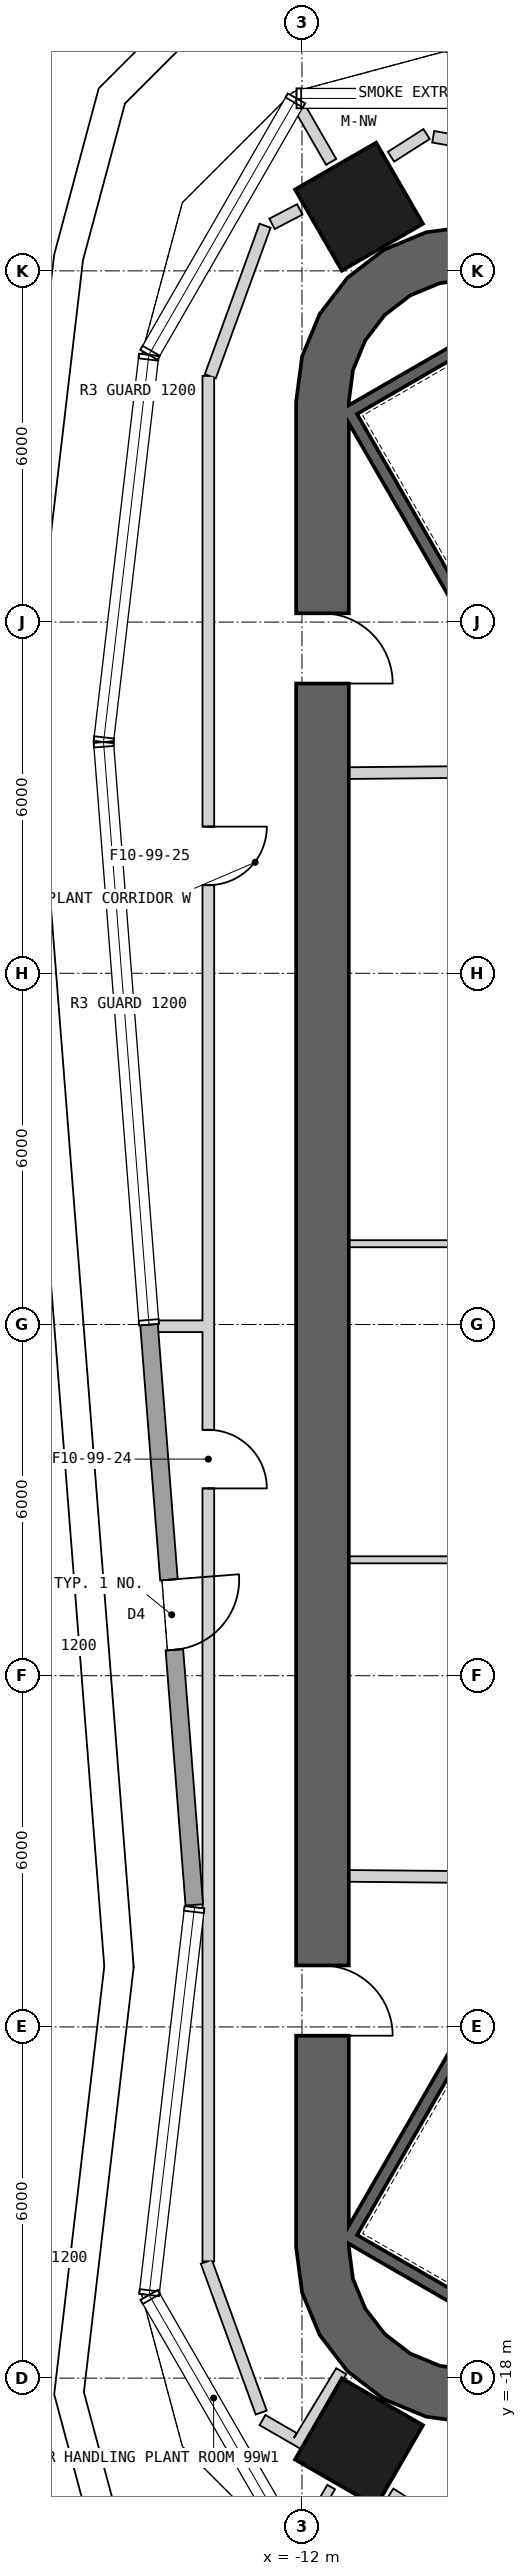
"""IFC4 building model, lengths in metres.
Left out: names, types, materials, properties, quantities, classifications, styles, units other than length and angle.
Written with IfcOpenShell. Run it as: python <this file> out.ifc"""

import sys

from ifc_helpers import new_model, si_unit, direction, frame, frame_2d, origin, origin_2d, place, context, subcontext, project, spatial, polyline, rectangle, outline, extrude, element, fill, save


model = new_model("IFC4")
c1 = context("Model", 3, precision=1e-05, world=origin(), true_north=direction((0.0, 1.0)))
c2 = subcontext(c1, "Body", "Model", "MODEL_VIEW")
j1 = project(units=[si_unit("LENGTHUNIT", "METRE"), si_unit("PLANEANGLEUNIT", "RADIAN")], contexts=[c1])
p1 = place(None, origin())
s1 = spatial("IfcSite", under=j1, at=p1, CompositionType="ELEMENT")
p2 = place(p1, origin())
s2 = spatial("IfcBuilding", under=s1, at=p2, CompositionType="ELEMENT")
p3 = place(p2, frame((0.0, 0.0, 440.3)))
s3 = spatial("IfcBuildingStorey", under=s2, at=p3, CompositionType="ELEMENT", Elevation=440.3)
for number, where, z_axis, x_axis in (
    (1, (-11.025, 19.097, 0.0), (0.0, 0.0, 1.0), (-0.5, 0.866, 0.0)),
    (2, (-11.025, -19.097, 0.0), (0.0, 0.0, 1.0), (-0.5, -0.866, 0.0)),
):
    element("IfcColumn", number, at=place(p3, frame(where, z_axis=z_axis, x_axis=x_axis)), inside=s3, PredefinedType="COLUMN", context=c2, shape_type="SweptSolid", body=[
        extrude(rectangle(XDim=1.6, YDim=1.6, at=origin_2d()), origin(), (0.0, 0.0, 1.0), 4.7),
    ])
p4 = place(p3, frame((-11.65, 15.762, 0.0), z_axis=(0.0, 0.0, 1.0), x_axis=(0.0, -1.0, 0.0)))
e3 = element("IfcWall", 3, at=p4, inside=s3, PredefinedType="SHEAR", context=c2, shape_type="SweptSolid", body=[
    extrude(rectangle(XDim=31.523, YDim=0.9, at=frame_2d((15.762, 0.0))), origin(), (0.0, 0.0, 1.0), 4.7),
])
p5 = place(p4, frame((3.612, 0.0, 0.0)))
e4 = element("IfcOpeningElement", 4, at=p5, cuts=e3, PredefinedType="OPENING", context=c2, shape_type="SweptSolid", body=[
    extrude(rectangle(XDim=1.2, YDim=2.4, at=frame_2d((0.6, 1.2))), frame((0.0, 0.46, 0.0), z_axis=(0.0, -1.0, 0.0), x_axis=(1.0, 0.0, 0.0)), (0.0, 0.0, 1.0), 0.92),
])
p6 = place(p4, frame((26.712, 0.0, 0.0)))
e5 = element("IfcOpeningElement", 5, at=p6, cuts=e3, PredefinedType="OPENING", context=c2, shape_type="SweptSolid", body=[
    extrude(rectangle(XDim=1.2, YDim=2.4, at=frame_2d((0.6, 1.2))), frame((0.0, 0.46, 0.0), z_axis=(0.0, -1.0, 0.0), x_axis=(1.0, 0.0, 0.0)), (0.0, 0.0, 1.0), 0.92),
])
p7 = place(p3, origin())
e6 = element("IfcWall", 6, at=p7, inside=s3, PredefinedType="SHEAR", context=c2, shape_type="SweptSolid", body=[
    extrude(outline(polyline([(-7.6, 18.36), (-8.323, 18.659), (-9.1, 18.762), (-9.876, 18.659), (-10.6, 18.36), (-11.221, 17.883), (-11.698, 17.262), (-11.998, 16.538), (-12.1, 15.762), (-11.2, 15.762), (-11.128, 16.305), (-10.919, 16.812), (-10.585, 17.247), (-10.15, 17.58), (-9.644, 17.79), (-9.1, 17.862), (-8.556, 17.79), (-8.05, 17.58), (-7.6, 18.36)])), origin(), (0.0, 0.0, 1.0), 4.7),
])
p8 = place(p3, origin())
e7 = element("IfcWall", 7, at=p8, inside=s3, PredefinedType="SHEAR", context=c2, shape_type="SweptSolid", body=[
    extrude(outline(polyline([(-12.1, -15.762), (-11.998, -16.538), (-11.698, -17.262), (-11.221, -17.883), (-10.6, -18.36), (-9.876, -18.659), (-9.1, -18.762), (-8.323, -18.659), (-7.6, -18.36), (-8.05, -17.58), (-8.556, -17.79), (-9.1, -17.862), (-9.644, -17.79), (-10.15, -17.58), (-10.585, -17.247), (-10.919, -16.812), (-11.128, -16.305), (-11.2, -15.762), (-12.1, -15.762)])), origin(), (0.0, 0.0, 1.0), 4.7),
])
p9 = place(p3, frame((-14.614, -0.002, 0.0), z_axis=(0.0, 0.0, 1.0), x_axis=(0.077860592968, -0.996964256161, 0.0)))
e8 = element("IfcWall", 8, at=p9, inside=s3, PredefinedType="SOLIDWALL", context=c2, shape_type="SweptSolid", body=[
    extrude(rectangle(XDim=9.943, YDim=0.3, at=frame_2d((4.972, 0.0))), origin(), (0.0, 0.0, 1.0), 4.7),
])
p10 = place(p9, frame((4.372, 0.0, 0.0)))
e9 = element("IfcOpeningElement", 9, at=p10, cuts=e8, PredefinedType="OPENING", context=c2, shape_type="SweptSolid", body=[
    extrude(rectangle(XDim=1.2, YDim=2.4, at=frame_2d((0.6, 1.2))), frame((0.0, 0.16, 0.0), z_axis=(0.0, -1.0, 0.0), x_axis=(1.0, 0.0, 0.0)), (0.0, 0.0, 1.0), 0.32),
])
p11 = place(p3, frame((-11.245, 15.678, -0.25), z_axis=(0.0, 0.0, 1.0), x_axis=(0.499977274689, -0.866038523851, 0.0)))
e10 = element("IfcWall", 10, at=p11, inside=s3, PredefinedType="SHEAR", context=c2, shape_type="SweptSolid", body=[
    extrude(rectangle(XDim=8.1, YDim=0.2, at=frame_2d((4.05, 0.0))), origin(), (0.0, 0.0, 1.0), 4.95),
])
for number, where, z_axis, x_axis in (
    (11, (-7.818, 17.541, -0.25), (0.0, 0.0, 1.0), (-0.866, -0.5, 0.0)),
    (12, (-11.282, -15.541, -0.25), (0.0, 0.0, 1.0), (0.866, -0.5, 0.0)),
):
    element("IfcWall", number, at=place(p3, frame(where, z_axis=z_axis, x_axis=x_axis)), inside=s3, PredefinedType="SHEAR", context=c2, shape_type="SweptSolid", body=[
        extrude(rectangle(XDim=3.8, YDim=0.2, at=frame_2d((1.9, 0.0))), origin(), (0.0, 0.0, 1.0), 4.95),
    ])
p12 = place(p3, frame((-7.196, -8.663, -0.25), z_axis=(0.0, 0.0, 1.0), x_axis=(-0.499997992926, -0.866026562566, 0.0)))
e13 = element("IfcWall", 13, at=p12, inside=s3, PredefinedType="SHEAR", context=c2, shape_type="SweptSolid", body=[
    extrude(rectangle(XDim=7.9, YDim=0.2, at=frame_2d((3.95, 0.0))), origin(), (0.0, 0.0, 1.0), 4.95),
])
p13 = place(p3, frame((-11.2, 1.38, 0.0), z_axis=(0.0, 0.0, 1.0), x_axis=(1.0, 0.0, 0.0)))
e14 = element("IfcWall", 14, at=p13, inside=s3, PredefinedType="PARTITIONING", context=c2, shape_type="SweptSolid", body=[
    extrude(rectangle(XDim=3.25, YDim=0.12, at=frame_2d((1.625, 0.0))), origin(), (0.0, 0.0, 1.0), 4.7),
])
p14 = place(p3, frame((-7.85, 9.451, 0.0), z_axis=(0.0, 0.0, 1.0), x_axis=(-0.999957167047, -0.009255488683, 0.0)))
e15 = element("IfcWall", 15, at=p14, inside=s3, PredefinedType="PARTITIONING", context=c2, shape_type="SweptSolid", body=[
    extrude(rectangle(XDim=3.35, YDim=0.2, at=frame_2d((1.675, 0.0))), origin(), (0.0, 0.0, 1.0), 4.7),
])
p15 = place(p3, frame((-11.2, -4.02, 0.0), z_axis=(0.0, 0.0, 1.0), x_axis=(1.0, 0.0, 0.0)))
e16 = element("IfcWall", 16, at=p15, inside=s3, PredefinedType="PARTITIONING", context=c2, shape_type="SweptSolid", body=[
    extrude(rectangle(XDim=3.25, YDim=0.12, at=frame_2d((1.625, 0.0))), origin(), (0.0, 0.0, 1.0), 4.7),
])
p16 = place(p3, frame((-11.2, -9.42, 0.0), z_axis=(0.0, 0.0, 1.0), x_axis=(0.999957467379, -0.009222983926, 0.0)))
e17 = element("IfcWall", 17, at=p16, inside=s3, PredefinedType="PARTITIONING", context=c2, shape_type="SweptSolid", body=[
    extrude(rectangle(XDim=3.15, YDim=0.2, at=frame_2d((1.575, 0.0))), origin(), (0.0, 0.0, 1.0), 4.7),
])
p17 = place(p3, frame((-12.104, -19.161, 0.0), z_axis=(0.0, 0.0, 1.0), x_axis=(0.518475368733, 0.855092563421, 0.0)))
e18 = element("IfcWall", 18, at=p17, inside=s3, PredefinedType="PARTITIONING", context=c2, shape_type="SweptSolid", body=[
    extrude(rectangle(XDim=1.496, YDim=0.2, at=frame_2d((0.748, 0.0))), origin(), (0.0, 0.0, 1.0), 4.7),
])
p18 = place(p3, frame((-12.675, -18.717, 0.0), z_axis=(0.0, 0.0, 1.0), x_axis=(0.866047486323, -0.49996174997, 0.0)))
e19 = element("IfcWall", 19, at=p18, inside=s3, PredefinedType="PARTITIONING", context=c2, shape_type="SweptSolid", body=[
    extrude(rectangle(XDim=0.618, YDim=0.2, at=frame_2d((0.309, 0.0))), origin(), (0.0, 0.0, 1.0), 4.7),
])
p19 = place(p3, frame((-13.634, -16.011, 0.0), z_axis=(0.0, 0.0, 1.0), x_axis=(0.342043269434, -0.939684203248, 0.0)))
e20 = element("IfcWall", 20, at=p19, inside=s3, PredefinedType="PARTITIONING", context=c2, shape_type="SweptSolid", body=[
    extrude(rectangle(XDim=2.742, YDim=0.2, at=frame_2d((1.371, 0.0))), origin(), (0.0, 0.0, 1.0), 4.7),
])
p20 = place(p3, frame((-13.6, 16.206, 0.0), z_axis=(0.0, 0.0, 1.0), x_axis=(0.0, -1.0, 0.0)))
e21 = element("IfcWall", 21, at=p20, inside=s3, PredefinedType="PARTITIONING", context=c2, shape_type="SweptSolid", body=[
    extrude(rectangle(XDim=16.256, YDim=0.2, at=frame_2d((8.128, 0.0))), origin(), (0.0, 0.0, 1.0), 4.7),
])
p21 = place(p20, frame((7.7, 0.0, 0.0)))
e22 = element("IfcOpeningElement", 22, at=p21, cuts=e21, PredefinedType="OPENING", context=c2, shape_type="SweptSolid", body=[
    extrude(rectangle(XDim=1.0, YDim=2.1, at=frame_2d((0.5, 1.05))), frame((0.0, 0.11, 0.0), z_axis=(0.0, -1.0, 0.0), x_axis=(1.0, 0.0, 0.0)), (0.0, 0.0, 1.0), 0.22),
])
p22 = place(p3, frame((-13.6, -0.05, 0.0), z_axis=(0.0, 0.0, 1.0), x_axis=(0.0, -1.0, 0.0)))
e23 = element("IfcWall", 23, at=p22, inside=s3, PredefinedType="PARTITIONING", context=c2, shape_type="SweptSolid", body=[
    extrude(rectangle(XDim=15.956, YDim=0.2, at=frame_2d((7.978, 0.0))), origin(), (0.0, 0.0, 1.0), 4.7),
])
p23 = place(p22, frame((1.75, 0.0, 0.0)))
e24 = element("IfcOpeningElement", 24, at=p23, cuts=e23, PredefinedType="OPENING", context=c2, shape_type="SweptSolid", body=[
    extrude(rectangle(XDim=1.0, YDim=2.1, at=frame_2d((0.5, 1.05))), frame((0.0, 0.11, 0.0), z_axis=(0.0, -1.0, 0.0), x_axis=(1.0, 0.0, 0.0)), (0.0, 0.0, 1.0), 0.22),
])
p24 = place(p3, frame((-12.63, 18.771, 0.0), z_axis=(0.0, 0.0, 1.0), x_axis=(-0.342015224264, -0.939694411163, 0.0)))
e25 = element("IfcWall", 25, at=p24, inside=s3, PredefinedType="PARTITIONING", context=c2, shape_type="SweptSolid", body=[
    extrude(rectangle(XDim=2.737, YDim=0.2, at=frame_2d((1.368, 0.0))), origin(), (0.0, 0.0, 1.0), 4.7),
])
p25 = place(p3, frame((-12.038, 19.05, 0.0), z_axis=(0.0, 0.0, 1.0), x_axis=(-0.887186880255, -0.461410272429, 0.0)))
e26 = element("IfcWall", 26, at=p25, inside=s3, PredefinedType="PARTITIONING", context=c2, shape_type="SweptSolid", body=[
    extrude(rectangle(XDim=0.534, YDim=0.2, at=frame_2d((0.267, 0.0))), origin(), (0.0, 0.0, 1.0), 4.7),
])
p26 = place(p3, frame((-14.486, -0.03, 0.0), z_axis=(0.0, 0.0, 1.0), x_axis=(1.0, 0.0, 0.0)))
e27 = element("IfcWall", 27, at=p26, inside=s3, PredefinedType="PARTITIONING", context=c2, shape_type="SweptSolid", body=[
    extrude(rectangle(XDim=0.786, YDim=0.2, at=frame_2d((0.393, 0.0))), origin(), (0.0, 0.0, 1.0), 4.7),
])
p27 = place(p3, frame((-11.501, -19.861, 0.0), z_axis=(0.0, 0.0, 1.0), x_axis=(-0.500107244371, -0.865963477364, 0.0)))
e28 = element("IfcWall", 28, at=p27, inside=s3, PredefinedType="PLUMBINGWALL", context=c2, shape_type="SweptSolid", body=[
    extrude(rectangle(XDim=1.098, YDim=0.15, at=frame_2d((0.549, 0.0))), origin(), (0.0, 0.0, 1.0), 4.7),
])
p28 = place(p3, frame((-11.501, 19.861, 0.0), z_axis=(0.0, 0.0, 1.0), x_axis=(-0.500107244371, 0.865963477364, 0.0)))
e29 = element("IfcWall", 29, at=p28, inside=s3, PredefinedType="PARTITIONING", context=c2, shape_type="SweptSolid", body=[
    extrude(rectangle(XDim=1.098, YDim=0.2, at=frame_2d((0.549, 0.0))), origin(), (0.0, 0.0, 1.0), 4.7),
])
p29 = place(p3, frame((-9.87, 20.337, 0.0), z_axis=(0.0, 0.0, 1.0), x_axis=(-0.843326891705, -0.537400924569, 0.0)))
e30 = element("IfcWall", 30, at=p29, inside=s3, PredefinedType="PARTITIONING", context=c2, shape_type="SweptSolid", body=[
    extrude(rectangle(XDim=0.721, YDim=0.2, at=frame_2d((0.361, 0.0))), origin(), (0.0, 0.0, 1.0), 4.7),
])
p30 = place(p3, frame((-7.246, 19.848, 0.0), z_axis=(0.0, 0.0, 1.0), x_axis=(-0.984816315713, 0.173599609177, 0.0)))
e31 = element("IfcWall", 31, at=p30, inside=s3, PredefinedType="PARTITIONING", context=c2, shape_type="SweptSolid", body=[
    extrude(rectangle(XDim=2.55, YDim=0.2, at=frame_2d((1.275, 0.0))), origin(), (0.0, 0.0, 1.0), 4.7),
])
p31 = place(p3, frame((-9.932, -20.322, 0.0), z_axis=(0.0, 0.0, 1.0), x_axis=(0.984813908974, 0.173613261856, 0.0)))
e32 = element("IfcWall", 32, at=p31, inside=s3, PredefinedType="PLUMBINGWALL", context=c2, shape_type="SweptSolid", body=[
    extrude(rectangle(XDim=2.752, YDim=0.15, at=frame_2d((1.376, 0.0))), origin(), (0.0, 0.0, 1.0), 4.7),
])
p32 = place(p3, frame((-10.479, -19.95, 0.0), z_axis=(0.0, 0.0, 1.0), x_axis=(0.843309487859, -0.537428234917, 0.0)))
e33 = element("IfcWall", 33, at=p32, inside=s3, PredefinedType="PLUMBINGWALL", context=c2, shape_type="SweptSolid", body=[
    extrude(rectangle(XDim=0.572, YDim=0.15, at=frame_2d((0.286, 0.0))), origin(), (0.0, 0.0, 1.0), 4.7),
])
p33 = place(p10, frame((1.2, 0.0, 0.0), z_axis=(0.0, 0.0, 1.0), x_axis=(-1.0, 0.0, 0.0)))
e34 = element("IfcDoor", 34, at=p33, inside=s3, OperationType="SINGLE_SWING_RIGHT", PredefinedType="DOOR", context=c2, shape_type="SweptSolid", body=[
    extrude(rectangle(XDim=1.2, YDim=2.4, at=frame_2d((0.6, 1.2))), frame((0.0, 0.025, 0.0), z_axis=(0.0, -1.0, 0.0), x_axis=(1.0, 0.0, 0.0)), (0.0, 0.0, 1.0), 0.05),
])
fill(e9, e34)
p34 = place(p23, origin())
e35 = element("IfcDoor", 35, at=p34, inside=s3, OperationType="SINGLE_SWING_RIGHT", PredefinedType="USERDEFINED", context=c2, shape_type="SweptSolid", body=[
    extrude(rectangle(XDim=1.0, YDim=2.1, at=frame_2d((0.5, 1.05))), frame((0.0, 0.025, 0.0), z_axis=(0.0, -1.0, 0.0), x_axis=(1.0, 0.0, 0.0)), (0.0, 0.0, 1.0), 0.05),
])
fill(e24, e35)
p35 = place(p21, origin())
e36 = element("IfcDoor", 36, at=p35, inside=s3, OperationType="SINGLE_SWING_LEFT", PredefinedType="USERDEFINED", context=c2, shape_type="SweptSolid", body=[
    extrude(rectangle(XDim=1.0, YDim=2.1, at=frame_2d((0.5, 1.05))), frame((0.0, 0.025, 0.0), z_axis=(0.0, -1.0, 0.0), x_axis=(1.0, 0.0, 0.0)), (0.0, 0.0, 1.0), 0.05),
])
fill(e22, e36)
p36 = place(p5, origin())
e37 = element("IfcDoor", 37, at=p36, inside=s3, OperationType="SINGLE_SWING_RIGHT", PredefinedType="USERDEFINED", context=c2, shape_type="SweptSolid", body=[
    extrude(rectangle(XDim=1.2, YDim=2.4, at=frame_2d((0.6, 1.2))), frame((0.0, 0.025, 0.0), z_axis=(0.0, -1.0, 0.0), x_axis=(1.0, 0.0, 0.0)), (0.0, 0.0, 1.0), 0.05),
])
fill(e4, e37)
p37 = place(p6, origin())
e38 = element("IfcDoor", 38, at=p37, inside=s3, OperationType="SINGLE_SWING_RIGHT", PredefinedType="USERDEFINED", context=c2, shape_type="SweptSolid", body=[
    extrude(rectangle(XDim=1.2, YDim=2.4, at=frame_2d((0.6, 1.2))), frame((0.0, 0.025, 0.0), z_axis=(0.0, -1.0, 0.0), x_axis=(1.0, 0.0, 0.0)), (0.0, 0.0, 1.0), 0.05),
])
fill(e5, e38)
save(model, sys.argv[1])
